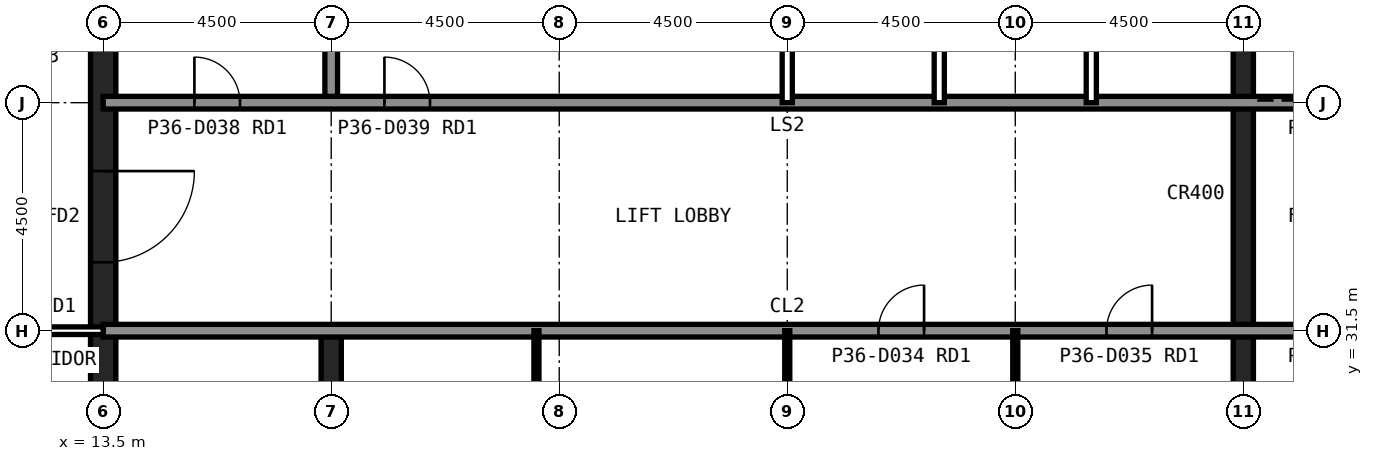
"""IFC4 building model, lengths in metres.
Left out: names, types, materials, properties, quantities, classifications, styles, units other than length and angle.
Written with IfcOpenShell. Run it as: python <this file> out.ifc"""

import sys

from ifc_helpers import new_model, si_unit, direction, frame, frame_2d, origin, place, context, subcontext, project, spatial, rectangle, extrude, element, fill, save


model = new_model("IFC4")
c1 = context("Model", 3, precision=1e-05, world=origin(), true_north=direction((0.0, 1.0)))
c2 = subcontext(c1, "Body", "Model", "MODEL_VIEW")
j1 = project(units=[si_unit("LENGTHUNIT", "METRE"), si_unit("PLANEANGLEUNIT", "RADIAN")], contexts=[c1])
p1 = place(None, origin())
s1 = spatial("IfcSite", under=j1, at=p1, CompositionType="ELEMENT")
p2 = place(p1, origin())
s2 = spatial("IfcBuilding", under=s1, at=p2, CompositionType="ELEMENT")
p3 = place(p2, frame((0.0, 0.0, 151.6)))
s3 = spatial("IfcBuildingStorey", under=s2, at=p3, CompositionType="ELEMENT", Elevation=151.6)
p4 = place(p3, frame((13.5, 40.5, 0.0), z_axis=(0.0, 0.0, 1.0), x_axis=(0.0, -1.0, 0.0)))
e1 = element("IfcWall", 1, at=p4, inside=s3, PredefinedType="SHEAR", context=c2, shape_type="SweptSolid", body=[
    extrude(rectangle(XDim=27.0, YDim=0.5, at=frame_2d((13.5, 0.0))), origin(), (0.0, 0.0, 1.0), 4.0),
])
p5 = place(p4, frame((19.65, 0.0, 0.0)))
e2 = element("IfcOpeningElement", 2, at=p5, cuts=e1, PredefinedType="OPENING", context=c2, shape_type="SweptSolid", body=[
    extrude(rectangle(XDim=1.2, YDim=2.1, at=frame_2d((0.6, 1.05))), frame((0.0, 0.26, 0.0), z_axis=(0.0, -1.0, 0.0), x_axis=(1.0, 0.0, 0.0)), (0.0, 0.0, 1.0), 0.52),
])
p6 = place(p4, frame((5.85, 0.0, 0.0)))
e3 = element("IfcOpeningElement", 3, at=p6, cuts=e1, PredefinedType="OPENING", context=c2, shape_type="SweptSolid", body=[
    extrude(rectangle(XDim=1.8, YDim=2.1, at=frame_2d((0.9, 1.05))), frame((0.0, 0.26, 0.0), z_axis=(0.0, -1.0, 0.0), x_axis=(1.0, 0.0, 0.0)), (0.0, 0.0, 1.0), 0.52),
])
p7 = place(p3, frame((18.0, 13.5, 0.0), z_axis=(0.0, 0.0, 1.0), x_axis=(0.0, 1.0, 0.0)))
e4 = element("IfcWall", 4, at=p7, inside=s3, PredefinedType="SHEAR", context=c2, shape_type="SweptSolid", body=[
    extrude(rectangle(XDim=18.0, YDim=0.4, at=frame_2d((9.0, 0.0))), origin(), (0.0, 0.0, 1.0), 4.0),
])
p8 = place(p3, frame((18.0, 36.0, 0.0), z_axis=(0.0, 0.0, 1.0), x_axis=(0.0, 1.0, 0.0)))
e5 = element("IfcWall", 5, at=p8, inside=s3, PredefinedType="SOLIDWALL", context=c2, shape_type="SweptSolid", body=[
    extrude(rectangle(XDim=4.5, YDim=0.25, at=frame_2d((2.25, 0.0))), origin(), (0.0, 0.0, 1.0), 3.84),
])
p9 = place(p3, frame((36.0, 22.5, 0.0), z_axis=(0.0, 0.0, 1.0), x_axis=(0.0, 1.0, 0.0)))
e6 = element("IfcWall", 6, at=p9, inside=s3, PredefinedType="SHEAR", context=c2, shape_type="SweptSolid", body=[
    extrude(rectangle(XDim=18.0, YDim=0.4, at=frame_2d((9.0, 0.0))), origin(), (0.0, 0.0, 1.0), 4.0),
])
p10 = place(p3, frame((13.5, 36.0, 0.0), z_axis=(0.0, 0.0, 1.0), x_axis=(1.0, 0.0, 0.0)))
e7 = element("IfcWall", 7, at=p10, inside=s3, PredefinedType="SOLIDWALL", context=c2, shape_type="SweptSolid", body=[
    extrude(rectangle(XDim=27.0, YDim=0.25, at=frame_2d((13.5, 0.0))), origin(), (0.0, 0.0, 1.0), 3.84),
])
p11 = place(p10, frame((1.8, 0.0, 0.0)))
e8 = element("IfcOpeningElement", 8, at=p11, cuts=e7, PredefinedType="OPENING", context=c2, shape_type="SweptSolid", body=[
    extrude(rectangle(XDim=0.9, YDim=2.1, at=frame_2d((0.45, 1.05))), frame((0.0, 0.135, 0.0), z_axis=(0.0, -1.0, 0.0), x_axis=(1.0, 0.0, 0.0)), (0.0, 0.0, 1.0), 0.27),
])
p12 = place(p10, frame((5.55, 0.0, 0.0)))
e9 = element("IfcOpeningElement", 9, at=p12, cuts=e7, PredefinedType="OPENING", context=c2, shape_type="SweptSolid", body=[
    extrude(rectangle(XDim=0.9, YDim=2.1, at=frame_2d((0.45, 1.05))), frame((0.0, 0.135, 0.0), z_axis=(0.0, -1.0, 0.0), x_axis=(1.0, 0.0, 0.0)), (0.0, 0.0, 1.0), 0.27),
])
p13 = place(p10, frame((8.55, 0.0, 0.0)))
e10 = element("IfcOpeningElement", 10, at=p13, cuts=e7, PredefinedType="OPENING", context=c2, shape_type="SweptSolid", body=[
    extrude(rectangle(XDim=0.9, YDim=2.1, at=frame_2d((0.45, 1.05))), frame((0.0, 0.135, 0.0), z_axis=(0.0, -1.0, 0.0), x_axis=(1.0, 0.0, 0.0)), (0.0, 0.0, 1.0), 0.27),
])
p14 = place(p10, frame((24.1, 0.0, 0.0)))
e11 = element("IfcOpeningElement", 11, at=p14, cuts=e7, PredefinedType="OPENING", context=c2, shape_type="SweptSolid", body=[
    extrude(rectangle(XDim=1.3, YDim=2.2, at=frame_2d((0.65, 1.1))), frame((0.0, 0.135, 0.0), z_axis=(0.0, -1.0, 0.0), x_axis=(1.0, 0.0, 0.0)), (0.0, 0.0, 1.0), 0.27),
])
p15 = place(p3, frame((13.5, 31.5, 0.0), z_axis=(0.0, 0.0, 1.0), x_axis=(1.0, 0.0, 0.0)))
e12 = element("IfcWall", 12, at=p15, inside=s3, PredefinedType="SOLIDWALL", context=c2, shape_type="SweptSolid", body=[
    extrude(rectangle(XDim=27.0, YDim=0.25, at=frame_2d((13.5, 0.0))), origin(), (0.0, 0.0, 1.0), 3.84),
])
p16 = place(p15, frame((24.15, 0.0, 0.0)))
e13 = element("IfcOpeningElement", 13, at=p16, cuts=e12, PredefinedType="OPENING", context=c2, shape_type="SweptSolid", body=[
    extrude(rectangle(XDim=1.2, YDim=2.1, at=frame_2d((0.6, 1.05))), frame((0.0, 0.135, 0.0), z_axis=(0.0, -1.0, 0.0), x_axis=(1.0, 0.0, 0.0)), (0.0, 0.0, 1.0), 0.27),
])
p17 = place(p15, frame((15.3, 0.0, 0.0)))
e14 = element("IfcOpeningElement", 14, at=p17, cuts=e12, PredefinedType="OPENING", context=c2, shape_type="SweptSolid", body=[
    extrude(rectangle(XDim=0.9, YDim=2.1, at=frame_2d((0.45, 1.05))), frame((0.0, 0.135, 0.0), z_axis=(0.0, -1.0, 0.0), x_axis=(1.0, 0.0, 0.0)), (0.0, 0.0, 1.0), 0.27),
])
p18 = place(p15, frame((19.8, 0.0, 0.0)))
e15 = element("IfcOpeningElement", 15, at=p18, cuts=e12, PredefinedType="OPENING", context=c2, shape_type="SweptSolid", body=[
    extrude(rectangle(XDim=0.9, YDim=2.1, at=frame_2d((0.45, 1.05))), frame((0.0, 0.135, 0.0), z_axis=(0.0, -1.0, 0.0), x_axis=(1.0, 0.0, 0.0)), (0.0, 0.0, 1.0), 0.27),
])
for number, where, z_axis, x_axis in (
    (16, (21.0, 36.0, 0.0), (0.0, 0.0, 1.0), (0.0, 1.0, 0.0)),
    (17, (27.0, 36.0, 0.0), (0.0, 0.0, 1.0), (0.0, 1.0, 0.0)),
    (18, (30.0, 36.0, 0.0), (0.0, 0.0, 1.0), (0.0, 1.0, 0.0)),
    (19, (33.0, 36.0, 0.0), (0.0, 0.0, 1.0), (0.0, 1.0, 0.0)),
):
    element("IfcWall", number, at=place(p3, frame(where, z_axis=z_axis, x_axis=x_axis)), inside=s3, PredefinedType="PARTITIONING", context=c2, shape_type="SweptSolid", body=[
        extrude(rectangle(XDim=4.5, YDim=0.2, at=frame_2d((2.25, 0.0))), origin(), (0.0, 0.0, 1.0), 3.84),
    ])
for number, where, z_axis, x_axis in (
    (20, (22.05, 22.5, 0.0), (0.0, 0.0, 1.0), (0.0, 1.0, 0.0)),
    (21, (27.0, 22.5, 0.0), (0.0, 0.0, 1.0), (0.0, 1.0, 0.0)),
    (22, (31.5, 22.5, 0.0), (0.0, 0.0, 1.0), (0.0, 1.0, 0.0)),
):
    element("IfcWall", number, at=place(p3, frame(where, z_axis=z_axis, x_axis=x_axis)), inside=s3, PredefinedType="PLUMBINGWALL", context=c2, shape_type="SweptSolid", body=[
        extrude(rectangle(XDim=9.0, YDim=0.1, at=frame_2d((4.5, 0.0))), origin(), (0.0, 0.0, 1.0), 3.84),
    ])
p19 = place(p3, frame((13.5, 31.5, 0.0), z_axis=(0.0, 0.0, 1.0), x_axis=(-1.0, 0.0, 0.0)))
e23 = element("IfcWall", 23, at=p19, inside=s3, PredefinedType="PARTITIONING", context=c2, shape_type="SweptSolid", body=[
    extrude(rectangle(XDim=3.6, YDim=0.15, at=frame_2d((1.8, 0.0))), origin(), (0.0, 0.0, 1.0), 2.989),
])
p20 = place(p19, frame((1.3, 0.0, 0.0)))
e24 = element("IfcOpeningElement", 24, at=p20, cuts=e23, PredefinedType="OPENING", context=c2, shape_type="SweptSolid", body=[
    extrude(rectangle(XDim=1.0, YDim=2.1, at=frame_2d((0.5, 1.05))), frame((0.0, 0.085, 0.0), z_axis=(0.0, -1.0, 0.0), x_axis=(1.0, 0.0, 0.0)), (0.0, 0.0, 1.0), 0.17),
])
p21 = place(p6, origin())
e25 = element("IfcDoor", 25, at=p21, inside=s3, OperationType="SINGLE_SWING_LEFT", PredefinedType="DOOR", context=c2, shape_type="SweptSolid", body=[
    extrude(rectangle(XDim=1.8, YDim=2.1, at=frame_2d((0.9, 1.05))), frame((0.0, 0.025, 0.0), z_axis=(0.0, -1.0, 0.0), x_axis=(1.0, 0.0, 0.0)), (0.0, 0.0, 1.0), 0.05),
])
fill(e3, e25)
p22 = place(p17, origin())
e26 = element("IfcDoor", 26, at=p22, inside=s3, OperationType="SINGLE_SWING_RIGHT", PredefinedType="DOOR", context=c2, shape_type="SweptSolid", body=[
    extrude(rectangle(XDim=0.9, YDim=2.1, at=frame_2d((0.45, 1.05))), frame((0.0, 0.025, 0.0), z_axis=(0.0, -1.0, 0.0), x_axis=(1.0, 0.0, 0.0)), (0.0, 0.0, 1.0), 0.05),
])
fill(e14, e26)
p23 = place(p18, origin())
e27 = element("IfcDoor", 27, at=p23, inside=s3, OperationType="SINGLE_SWING_RIGHT", PredefinedType="DOOR", context=c2, shape_type="SweptSolid", body=[
    extrude(rectangle(XDim=0.9, YDim=2.1, at=frame_2d((0.45, 1.05))), frame((0.0, 0.025, 0.0), z_axis=(0.0, -1.0, 0.0), x_axis=(1.0, 0.0, 0.0)), (0.0, 0.0, 1.0), 0.05),
])
fill(e15, e27)
p24 = place(p11, origin())
e28 = element("IfcDoor", 28, at=p24, inside=s3, OperationType="SINGLE_SWING_LEFT", PredefinedType="DOOR", context=c2, shape_type="SweptSolid", body=[
    extrude(rectangle(XDim=0.9, YDim=2.1, at=frame_2d((0.45, 1.05))), frame((0.0, 0.025, 0.0), z_axis=(0.0, -1.0, 0.0), x_axis=(1.0, 0.0, 0.0)), (0.0, 0.0, 1.0), 0.05),
])
fill(e8, e28)
p25 = place(p12, origin())
e29 = element("IfcDoor", 29, at=p25, inside=s3, OperationType="SINGLE_SWING_LEFT", PredefinedType="DOOR", context=c2, shape_type="SweptSolid", body=[
    extrude(rectangle(XDim=0.9, YDim=2.1, at=frame_2d((0.45, 1.05))), frame((0.0, 0.025, 0.0), z_axis=(0.0, -1.0, 0.0), x_axis=(1.0, 0.0, 0.0)), (0.0, 0.0, 1.0), 0.05),
])
fill(e9, e29)
p26 = place(p13, origin())
e30 = element("IfcDoor", 30, at=p26, inside=s3, OperationType="SINGLE_SWING_LEFT", PredefinedType="DOOR", context=c2, shape_type="SweptSolid", body=[
    extrude(rectangle(XDim=0.9, YDim=2.1, at=frame_2d((0.45, 1.05))), frame((0.0, 0.025, 0.0), z_axis=(0.0, -1.0, 0.0), x_axis=(1.0, 0.0, 0.0)), (0.0, 0.0, 1.0), 0.05),
])
fill(e10, e30)
save(model, sys.argv[1])
